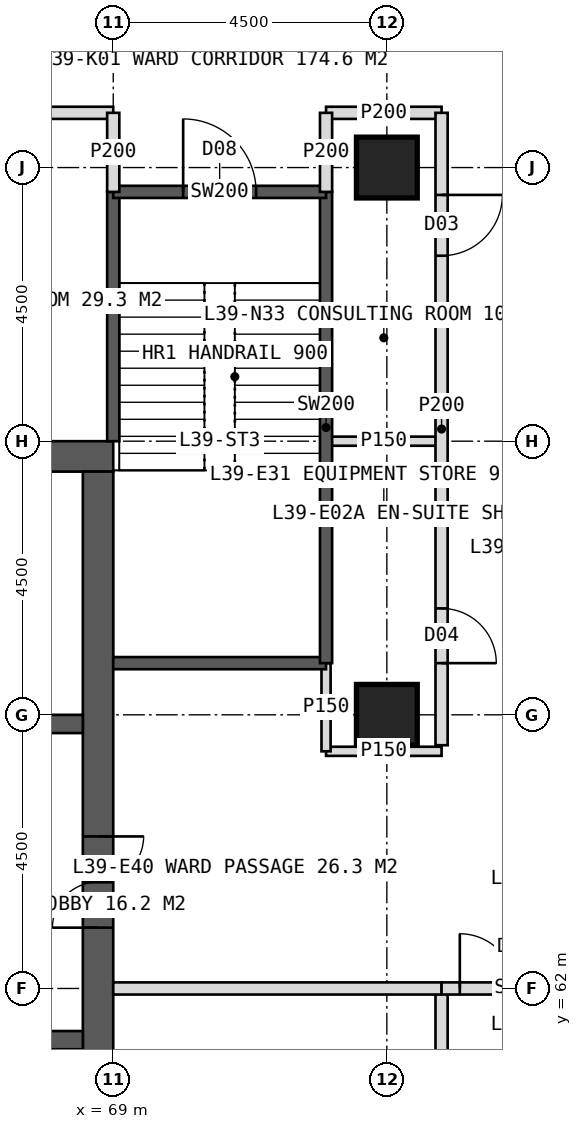
"""IFC4 building model, lengths in metres.
Left out: names, types, materials, properties, quantities, classifications, styles, units other than length and angle.
Written with IfcOpenShell. Run it as: python <this file> out.ifc"""

import sys

from ifc_helpers import new_model, si_unit, direction, frame, frame_2d, origin, origin_2d, place, context, subcontext, project, spatial, rectangle, hollow_rectangle, extrude, element, fill, save


model = new_model("IFC4")
c1 = context("Model", 3, precision=1e-05, world=origin(), true_north=direction((0.0, 1.0)))
c2 = subcontext(c1, "Body", "Model", "MODEL_VIEW")
j1 = project(units=[si_unit("LENGTHUNIT", "METRE"), si_unit("PLANEANGLEUNIT", "RADIAN")], contexts=[c1])
p1 = place(None, origin())
s1 = spatial("IfcSite", under=j1, at=p1, CompositionType="ELEMENT")
p2 = place(p1, origin())
s2 = spatial("IfcBuilding", under=s1, at=p2, CompositionType="ELEMENT")
p3 = place(p2, frame((0.0, 0.0, 164.0)))
s3 = spatial("IfcBuildingStorey", under=s2, at=p3, CompositionType="ELEMENT", Elevation=164.0)
p4 = place(p3, frame((51.0, 70.75, 0.0), z_axis=(0.0, 0.0, 1.0), x_axis=(1.0, 0.0, 0.0)))
e1 = element("IfcWall", 1, at=p4, inside=s3, PredefinedType="SHEAR", context=c2, shape_type="SweptSolid", body=[
    extrude(rectangle(XDim=18.0, YDim=0.5, at=frame_2d((9.0, 0.0))), origin(), (0.0, 0.0, 1.0), 4.0),
])
p5 = place(p4, frame((8.1, 0.0, 0.0)))
e2 = element("IfcOpeningElement", 2, at=p5, cuts=e1, PredefinedType="OPENING", context=c2, shape_type="SweptSolid", body=[
    extrude(rectangle(XDim=1.8, YDim=2.2, at=frame_2d((0.9, 1.1))), frame((0.0, 0.26, 0.0), z_axis=(0.0, -1.0, 0.0), x_axis=(1.0, 0.0, 0.0)), (0.0, 0.0, 1.0), 0.52),
])
p6 = place(p3, frame((68.75, 53.5, 0.0), z_axis=(0.0, 0.0, 1.0), x_axis=(0.0, 1.0, 0.0)))
e3 = element("IfcWall", 3, at=p6, inside=s3, PredefinedType="SHEAR", context=c2, shape_type="SweptSolid", body=[
    extrude(rectangle(XDim=17.0, YDim=0.5, at=frame_2d((8.5, 0.0))), origin(), (0.0, 0.0, 1.0), 4.0),
])
p7 = place(p6, frame((9.5, 0.0, 0.0)))
e4 = element("IfcOpeningElement", 4, at=p7, cuts=e3, PredefinedType="OPENING", context=c2, shape_type="SweptSolid", body=[
    extrude(rectangle(XDim=1.5, YDim=2.2, at=frame_2d((0.75, 1.1))), frame((0.0, 0.26, 0.0), z_axis=(0.0, -1.0, 0.0), x_axis=(1.0, 0.0, 0.0)), (0.0, 0.0, 1.0), 0.52),
])
p8 = place(p3, frame((65.2, 61.15, 0.0), z_axis=(0.0, 0.0, 1.0), x_axis=(1.0, 0.0, 0.0)))
e5 = element("IfcWall", 5, at=p8, inside=s3, PredefinedType="SHEAR", context=c2, shape_type="SweptSolid", body=[
    extrude(rectangle(XDim=3.3, YDim=0.3, at=frame_2d((1.65, 0.0))), origin(), (0.0, 0.0, 1.0), 4.0),
])
p9 = place(p8, frame((1.05, 0.0, 0.0)))
e6 = element("IfcOpeningElement", 6, at=p9, cuts=e5, PredefinedType="OPENING", context=c2, shape_type="SweptSolid", body=[
    extrude(rectangle(XDim=1.2, YDim=2.1, at=frame_2d((0.6, 1.05))), frame((0.0, 0.16, 0.0), z_axis=(0.0, -1.0, 0.0), x_axis=(1.0, 0.0, 0.0)), (0.0, 0.0, 1.0), 0.32),
])
p10 = place(p3, frame((65.2, 66.35, 0.0), z_axis=(0.0, 0.0, 1.0), x_axis=(1.0, 0.0, 0.0)))
e7 = element("IfcWall", 7, at=p10, inside=s3, PredefinedType="SHEAR", context=c2, shape_type="SweptSolid", body=[
    extrude(rectangle(XDim=3.3, YDim=0.3, at=frame_2d((1.65, 0.0))), origin(), (0.0, 0.0, 1.0), 4.0),
])
p11 = place(p10, frame((1.05, 0.0, 0.0)))
e8 = element("IfcOpeningElement", 8, at=p11, cuts=e7, PredefinedType="OPENING", context=c2, shape_type="SweptSolid", body=[
    extrude(rectangle(XDim=1.2, YDim=2.2, at=frame_2d((0.6, 1.1))), frame((0.0, 0.16, 0.0), z_axis=(0.0, -1.0, 0.0), x_axis=(1.0, 0.0, 0.0)), (0.0, 0.0, 1.0), 0.32),
])
for number, where, z_axis, x_axis in (
    (9, (73.5, 75.5, 0.0), (0.0, 0.0, 1.0), (1.0, 0.0, 0.0)),
    (10, (73.5, 66.5, 0.0), (0.0, 0.0, 1.0), (1.0, 0.0, 0.0)),
):
    element("IfcColumn", number, at=place(p3, frame(where, z_axis=z_axis, x_axis=x_axis)), inside=s3, PredefinedType="COLUMN", context=c2, shape_type="SweptSolid", body=[
        extrude(hollow_rectangle(XDim=1.0, YDim=1.0, WallThickness=0.1, at=origin_2d()), origin(), (0.0, 0.0, 1.0), 4.0),
    ])
p12 = place(p3, frame((62.25, 76.4, 0.0), z_axis=(0.0, 0.0, 1.0), x_axis=(1.0, 0.0, 0.0)))
e11 = element("IfcWall", 11, at=p12, inside=s3, PredefinedType="PARTITIONING", context=c2, shape_type="SweptSolid", body=[
    extrude(rectangle(XDim=6.75, YDim=0.2, at=frame_2d((3.375, 0.0))), origin(), (0.0, 0.0, 1.0), 3.75),
])
p13 = place(p12, frame((4.3, 0.0, 0.0)))
e12 = element("IfcOpeningElement", 12, at=p13, cuts=e11, PredefinedType="OPENING", context=c2, shape_type="SweptSolid", body=[
    extrude(rectangle(XDim=1.0, YDim=2.1, at=frame_2d((0.5, 1.05))), frame((0.0, 0.11, 0.0), z_axis=(0.0, -1.0, 0.0), x_axis=(1.0, 0.0, 0.0)), (0.0, 0.0, 1.0), 0.22),
])
p14 = place(p3, frame((72.5, 76.4, 0.0), z_axis=(0.0, 0.0, 1.0), x_axis=(1.0, 0.0, 0.0)))
e13 = element("IfcWall", 13, at=p14, inside=s3, PredefinedType="PARTITIONING", context=c2, shape_type="SweptSolid", body=[
    extrude(rectangle(XDim=1.9, YDim=0.2, at=frame_2d((0.95, 0.0))), origin(), (0.0, 0.0, 1.0), 3.75),
])
p15 = place(p3, frame((72.5, 71.0, 0.0), z_axis=(0.0, 0.0, 1.0), x_axis=(1.0, 0.0, 0.0)))
e14 = element("IfcWall", 14, at=p15, inside=s3, PredefinedType="PARTITIONING", context=c2, shape_type="SweptSolid", body=[
    extrude(rectangle(XDim=1.9, YDim=0.15, at=frame_2d((0.95, 0.0))), origin(), (0.0, 0.0, 1.0), 3.75),
])
p16 = place(p3, frame((74.4, 76.4, 0.0), z_axis=(0.0, 0.0, 1.0), x_axis=(0.0, -1.0, 0.0)))
e15 = element("IfcWall", 15, at=p16, inside=s3, PredefinedType="PARTITIONING", context=c2, shape_type="SweptSolid", body=[
    extrude(rectangle(XDim=10.4, YDim=0.2, at=frame_2d((5.2, 0.0))), origin(), (0.0, 0.0, 1.0), 3.75),
])
p17 = place(p16, frame((1.35, 0.0, 0.0)))
e16 = element("IfcOpeningElement", 16, at=p17, cuts=e15, PredefinedType="OPENING", context=c2, shape_type="SweptSolid", body=[
    extrude(rectangle(XDim=1.0, YDim=2.1, at=frame_2d((0.5, 1.05))), frame((0.0, 0.11, 0.0), z_axis=(0.0, -1.0, 0.0), x_axis=(1.0, 0.0, 0.0)), (0.0, 0.0, 1.0), 0.22),
])
p18 = place(p16, frame((8.15, 0.0, 0.0)))
e17 = element("IfcOpeningElement", 17, at=p18, cuts=e15, PredefinedType="OPENING", context=c2, shape_type="SweptSolid", body=[
    extrude(rectangle(XDim=0.9, YDim=2.1, at=frame_2d((0.45, 1.05))), frame((0.0, 0.11, 0.0), z_axis=(0.0, -1.0, 0.0), x_axis=(1.0, 0.0, 0.0)), (0.0, 0.0, 1.0), 0.22),
])
p19 = place(p3, frame((74.4, 62.0, 0.0), z_axis=(0.0, 0.0, 1.0), x_axis=(0.0, -1.0, 0.0)))
e18 = element("IfcWall", 18, at=p19, inside=s3, PredefinedType="PARTITIONING", context=c2, shape_type="SweptSolid", body=[
    extrude(rectangle(XDim=14.4, YDim=0.2, at=frame_2d((7.2, 0.0))), origin(), (0.0, 0.0, 1.0), 3.75),
])
p20 = place(p19, frame((1.45, 0.0, 0.0)))
e19 = element("IfcOpeningElement", 19, at=p20, cuts=e18, PredefinedType="OPENING", context=c2, shape_type="SweptSolid", body=[
    extrude(rectangle(XDim=1.0, YDim=2.1, at=frame_2d((0.5, 1.05))), frame((0.0, 0.11, 0.0), z_axis=(0.0, -1.0, 0.0), x_axis=(1.0, 0.0, 0.0)), (0.0, 0.0, 1.0), 0.22),
])
p21 = place(p19, frame((11.2, 0.0, 0.0)))
e20 = element("IfcOpeningElement", 20, at=p21, cuts=e18, PredefinedType="OPENING", context=c2, shape_type="SweptSolid", body=[
    extrude(rectangle(XDim=1.0, YDim=2.1, at=frame_2d((0.5, 1.05))), frame((0.0, 0.11, 0.0), z_axis=(0.0, -1.0, 0.0), x_axis=(1.0, 0.0, 0.0)), (0.0, 0.0, 1.0), 0.22),
])
p22 = place(p3, frame((72.5, 65.9, 0.0), z_axis=(0.0, 0.0, 1.0), x_axis=(1.0, 0.0, 0.0)))
e21 = element("IfcWall", 21, at=p22, inside=s3, PredefinedType="PARTITIONING", context=c2, shape_type="SweptSolid", body=[
    extrude(rectangle(XDim=1.9, YDim=0.15, at=frame_2d((0.95, 0.0))), origin(), (0.0, 0.0, 1.0), 3.75),
])
p23 = place(p3, frame((69.0, 62.0, 0.0), z_axis=(0.0, 0.0, 1.0), x_axis=(1.0, 0.0, 0.0)))
e22 = element("IfcWall", 22, at=p23, inside=s3, PredefinedType="SOLIDWALL", context=c2, shape_type="SweptSolid", body=[
    extrude(rectangle(XDim=5.4, YDim=0.2, at=frame_2d((2.7, 0.0))), origin(), (0.0, 0.0, 1.0), 2.95),
])
p24 = place(p3, frame((74.4, 62.0, 0.0), z_axis=(0.0, 0.0, 1.0), x_axis=(1.0, 0.0, 0.0)))
e23 = element("IfcWall", 23, at=p24, inside=s3, PredefinedType="SOLIDWALL", context=c2, shape_type="SweptSolid", body=[
    extrude(rectangle(XDim=2.7, YDim=0.2, at=frame_2d((1.35, 0.0))), origin(), (0.0, 0.0, 1.0), 2.95),
])
p25 = place(p24, frame((0.3, 0.0, 0.0)))
e24 = element("IfcOpeningElement", 24, at=p25, cuts=e23, PredefinedType="OPENING", context=c2, shape_type="SweptSolid", body=[
    extrude(rectangle(XDim=1.8, YDim=2.2, at=frame_2d((0.9, 1.1))), frame((0.0, 0.11, 0.0), z_axis=(0.0, -1.0, 0.0), x_axis=(1.0, 0.0, 0.0)), (0.0, 0.0, 1.0), 0.22),
])
p26 = place(p3, frame((72.5, 65.9, 0.0), z_axis=(0.0, 0.0, 1.0), x_axis=(0.0, 1.0, 0.0)))
e25 = element("IfcWall", 25, at=p26, inside=s3, PredefinedType="PARTITIONING", context=c2, shape_type="SweptSolid", body=[
    extrude(rectangle(XDim=1.45, YDim=0.15, at=frame_2d((0.725, 0.0))), origin(), (0.0, 0.0, 1.0), 3.75),
])
p27 = place(p3, frame((69.0, 71.0, 0.0), z_axis=(0.0, 0.0, 1.0), x_axis=(0.0, 1.0, 0.0)))
e26 = element("IfcWall", 26, at=p27, inside=s3, PredefinedType="SOLIDWALL", context=c2, shape_type="SweptSolid", body=[
    extrude(rectangle(XDim=4.1, YDim=0.2, at=frame_2d((2.05, 0.0))), origin(), (0.0, 0.0, 1.0), 3.75),
])
p28 = place(p3, frame((69.0, 67.35, 0.0), z_axis=(0.0, 0.0, 1.0), x_axis=(1.0, 0.0, 0.0)))
e27 = element("IfcWall", 27, at=p28, inside=s3, PredefinedType="SOLIDWALL", context=c2, shape_type="SweptSolid", body=[
    extrude(rectangle(XDim=3.5, YDim=0.2, at=frame_2d((1.75, 0.0))), origin(), (0.0, 0.0, 1.0), 3.75),
])
p29 = place(p3, frame((72.5, 67.35, 0.0), z_axis=(0.0, 0.0, 1.0), x_axis=(0.0, 1.0, 0.0)))
e28 = element("IfcWall", 28, at=p29, inside=s3, PredefinedType="SOLIDWALL", context=c2, shape_type="SweptSolid", body=[
    extrude(rectangle(XDim=7.75, YDim=0.2, at=frame_2d((3.875, 0.0))), origin(), (0.0, 0.0, 1.0), 3.75),
])
p30 = place(p3, frame((69.0, 75.1, 0.0), z_axis=(0.0, 0.0, 1.0), x_axis=(1.0, 0.0, 0.0)))
e29 = element("IfcWall", 29, at=p30, inside=s3, PredefinedType="SOLIDWALL", context=c2, shape_type="SweptSolid", body=[
    extrude(rectangle(XDim=3.5, YDim=0.2, at=frame_2d((1.75, 0.0))), origin(), (0.0, 0.0, 1.0), 3.75),
])
p31 = place(p30, frame((1.15, 0.0, 0.0)))
e30 = element("IfcOpeningElement", 30, at=p31, cuts=e29, PredefinedType="OPENING", context=c2, shape_type="SweptSolid", body=[
    extrude(rectangle(XDim=1.2, YDim=2.1, at=frame_2d((0.6, 1.05))), frame((0.0, 0.11, 0.0), z_axis=(0.0, -1.0, 0.0), x_axis=(1.0, 0.0, 0.0)), (0.0, 0.0, 1.0), 0.22),
])
for number, where, z_axis, x_axis in (
    (31, (69.0, 75.1, 0.0), (0.0, 0.0, 1.0), (0.0, 1.0, 0.0)),
    (32, (72.5, 75.1, 0.0), (0.0, 0.0, 1.0), (0.0, 1.0, 0.0)),
):
    element("IfcWall", number, at=place(p3, frame(where, z_axis=z_axis, x_axis=x_axis)), inside=s3, PredefinedType="PARTITIONING", context=c2, shape_type="SweptSolid", body=[
        extrude(rectangle(XDim=1.3, YDim=0.2, at=frame_2d((0.65, 0.0))), origin(), (0.0, 0.0, 1.0), 3.75),
    ])
p32 = place(p17, origin())
e33 = element("IfcDoor", 33, at=p32, inside=s3, OperationType="SINGLE_SWING_LEFT", PredefinedType="DOOR", context=c2, shape_type="SweptSolid", body=[
    extrude(rectangle(XDim=1.0, YDim=2.1, at=frame_2d((0.5, 1.05))), frame((0.0, 0.025, 0.0), z_axis=(0.0, -1.0, 0.0), x_axis=(1.0, 0.0, 0.0)), (0.0, 0.0, 1.0), 0.05),
])
fill(e16, e33)
p33 = place(p18, origin())
e34 = element("IfcDoor", 34, at=p33, inside=s3, OperationType="SINGLE_SWING_RIGHT", PredefinedType="DOOR", context=c2, shape_type="SweptSolid", body=[
    extrude(rectangle(XDim=0.9, YDim=2.1, at=frame_2d((0.45, 1.05))), frame((0.0, 0.025, 0.0), z_axis=(0.0, -1.0, 0.0), x_axis=(1.0, 0.0, 0.0)), (0.0, 0.0, 1.0), 0.05),
])
fill(e17, e34)
p34 = place(p25, origin())
e35 = element("IfcDoor", 35, at=p34, inside=s3, OperationType="DOUBLE_DOOR_DOUBLE_SWING", PredefinedType="DOOR", context=c2, shape_type="SweptSolid", body=[
    extrude(rectangle(XDim=1.8, YDim=2.2, at=frame_2d((0.9, 1.1))), frame((0.0, 0.025, 0.0), z_axis=(0.0, -1.0, 0.0), x_axis=(1.0, 0.0, 0.0)), (0.0, 0.0, 1.0), 0.05),
])
fill(e24, e35)
p35 = place(p7, origin())
e36 = element("IfcDoor", 36, at=p35, inside=s3, OperationType="DOUBLE_DOOR_SINGLE_SWING", PredefinedType="DOOR", context=c2, shape_type="SweptSolid", body=[
    extrude(rectangle(XDim=1.5, YDim=2.2, at=frame_2d((0.75, 1.1))), frame((0.0, 0.025, 0.0), z_axis=(0.0, -1.0, 0.0), x_axis=(1.0, 0.0, 0.0)), (0.0, 0.0, 1.0), 0.05),
])
fill(e4, e36)
p36 = place(p31, origin())
e37 = element("IfcDoor", 37, at=p36, inside=s3, OperationType="SINGLE_SWING_LEFT", PredefinedType="DOOR", context=c2, shape_type="SweptSolid", body=[
    extrude(rectangle(XDim=1.2, YDim=2.1, at=frame_2d((0.6, 1.05))), frame((0.0, 0.025, 0.0), z_axis=(0.0, -1.0, 0.0), x_axis=(1.0, 0.0, 0.0)), (0.0, 0.0, 1.0), 0.05),
])
fill(e30, e37)
save(model, sys.argv[1])
